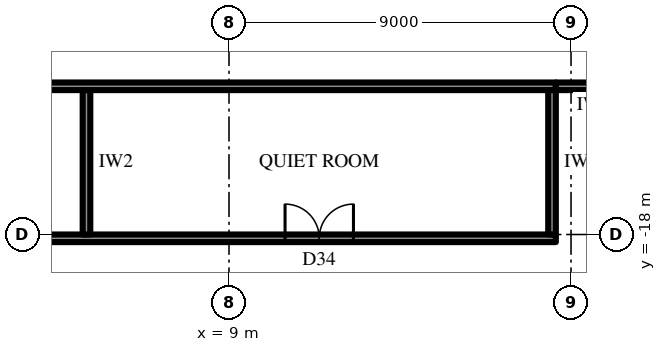
"""IFC4 building model, lengths in metres.
Left out: names, types, materials, properties, quantities, classifications, styles, units other than length and angle.
Written with IfcOpenShell. Run it as: python <this file> out.ifc"""

import sys

from ifc_helpers import new_model, si_unit, direction, frame, frame_2d, origin, place, context, subcontext, project, spatial, rectangle, extrude, element, fill, save


model = new_model("IFC4")
c1 = context("Model", 3, precision=1e-05, world=origin(), true_north=direction((0.0, 1.0)))
c2 = subcontext(c1, "Body", "Model", "MODEL_VIEW")
j1 = project(units=[si_unit("LENGTHUNIT", "METRE"), si_unit("PLANEANGLEUNIT", "RADIAN")], contexts=[c1])
p1 = place(None, origin())
s1 = spatial("IfcSite", under=j1, at=p1, CompositionType="ELEMENT")
p2 = place(p1, origin())
s2 = spatial("IfcBuilding", under=s1, at=p2, CompositionType="ELEMENT")
p3 = place(p2, frame((0.0, 0.0, 31.9)))
s3 = spatial("IfcBuildingStorey", under=s2, at=p3, CompositionType="ELEMENT", Elevation=31.9)
p4 = place(p3, frame((17.6, -14.1, 0.0), z_axis=(0.0, 0.0, 1.0), x_axis=(-1.0, 0.0, 0.0)))
e1 = element("IfcWall", 1, at=p4, inside=s3, PredefinedType="PARTITIONING", context=c2, shape_type="SweptSolid", body=[
    extrude(rectangle(XDim=35.2, YDim=0.2, at=frame_2d((17.6, 0.0))), origin(), (0.0, 0.0, 1.0), 4.0),
])
p5 = place(p3, frame((17.6, -18.1, 0.0), z_axis=(0.0, 0.0, 1.0), x_axis=(-1.0, 0.0, 0.0)))
e2 = element("IfcWall", 2, at=p5, inside=s3, PredefinedType="PARTITIONING", context=c2, shape_type="SweptSolid", body=[
    extrude(rectangle(XDim=35.2, YDim=0.2, at=frame_2d((17.6, 0.0))), origin(), (0.0, 0.0, 1.0), 4.0),
])
p6 = place(p5, frame((5.325, 0.0, 0.0)))
e3 = element("IfcOpeningElement", 3, at=p6, cuts=e2, PredefinedType="OPENING", context=c2, shape_type="SweptSolid", body=[
    extrude(rectangle(XDim=1.8, YDim=2.4, at=frame_2d((0.9, 1.2))), frame((0.0, 0.11, 0.0), z_axis=(0.0, -1.0, 0.0), x_axis=(1.0, 0.0, 0.0)), (0.0, 0.0, 1.0), 0.22),
])
p7 = place(p5, frame((16.225, 0.0, 0.0)))
e4 = element("IfcOpeningElement", 4, at=p7, cuts=e2, PredefinedType="OPENING", context=c2, shape_type="SweptSolid", body=[
    extrude(rectangle(XDim=1.0, YDim=2.2, at=frame_2d((0.5, 1.1))), frame((0.0, 0.11, 0.0), z_axis=(0.0, -1.0, 0.0), x_axis=(1.0, 0.0, 0.0)), (0.0, 0.0, 1.0), 0.22),
])
p8 = place(p5, frame((27.2, 0.0, 0.0)))
e5 = element("IfcOpeningElement", 5, at=p8, cuts=e2, PredefinedType="OPENING", context=c2, shape_type="SweptSolid", body=[
    extrude(rectangle(XDim=1.8, YDim=2.4, at=frame_2d((0.9, 1.2))), frame((0.0, 0.11, 0.0), z_axis=(0.0, -1.0, 0.0), x_axis=(1.0, 0.0, 0.0)), (0.0, 0.0, 1.0), 0.22),
])
p9 = place(p3, frame((17.5, -14.2, 0.0), z_axis=(0.0, 0.0, 1.0), x_axis=(0.0, -1.0, 0.0)))
e6 = element("IfcWall", 6, at=p9, inside=s3, PredefinedType="PARTITIONING", context=c2, shape_type="SweptSolid", body=[
    extrude(rectangle(XDim=3.8, YDim=0.2, at=frame_2d((1.9, 0.0))), origin(), (0.0, 0.0, 1.0), 4.0),
])
p10 = place(p3, frame((5.25, -14.2, 0.0), z_axis=(0.0, 0.0, 1.0), x_axis=(0.0, -1.0, 0.0)))
e7 = element("IfcWall", 7, at=p10, inside=s3, PredefinedType="PARTITIONING", context=c2, shape_type="SweptSolid", body=[
    extrude(rectangle(XDim=3.8, YDim=0.2, at=frame_2d((1.9, 0.0))), origin(), (0.0, 0.0, 1.0), 2.944),
])
p11 = place(p3, frame((19.6, -14.1, 0.0), z_axis=(0.0, 0.0, 1.0), x_axis=(-1.0, 0.0, 0.0)))
e8 = element("IfcWall", 8, at=p11, inside=s3, PredefinedType="PARTITIONING", context=c2, shape_type="SweptSolid", body=[
    extrude(rectangle(XDim=2.0, YDim=0.2, at=frame_2d((1.0, 0.0))), origin(), (0.0, 0.0, 1.0), 4.0),
])
p12 = place(p6, frame((1.8, 0.0, 0.0), z_axis=(0.0, 0.0, 1.0), x_axis=(-1.0, 0.0, 0.0)))
e9 = element("IfcDoor", 9, at=p12, inside=s3, OperationType="DOUBLE_DOOR_SINGLE_SWING", PredefinedType="DOOR", context=c2, shape_type="SweptSolid", body=[
    extrude(rectangle(XDim=1.8, YDim=2.4, at=frame_2d((0.9, 1.2))), frame((0.0, 0.025, 0.0), z_axis=(0.0, -1.0, 0.0), x_axis=(1.0, 0.0, 0.0)), (0.0, 0.0, 1.0), 0.05),
])
fill(e3, e9)
save(model, sys.argv[1])
